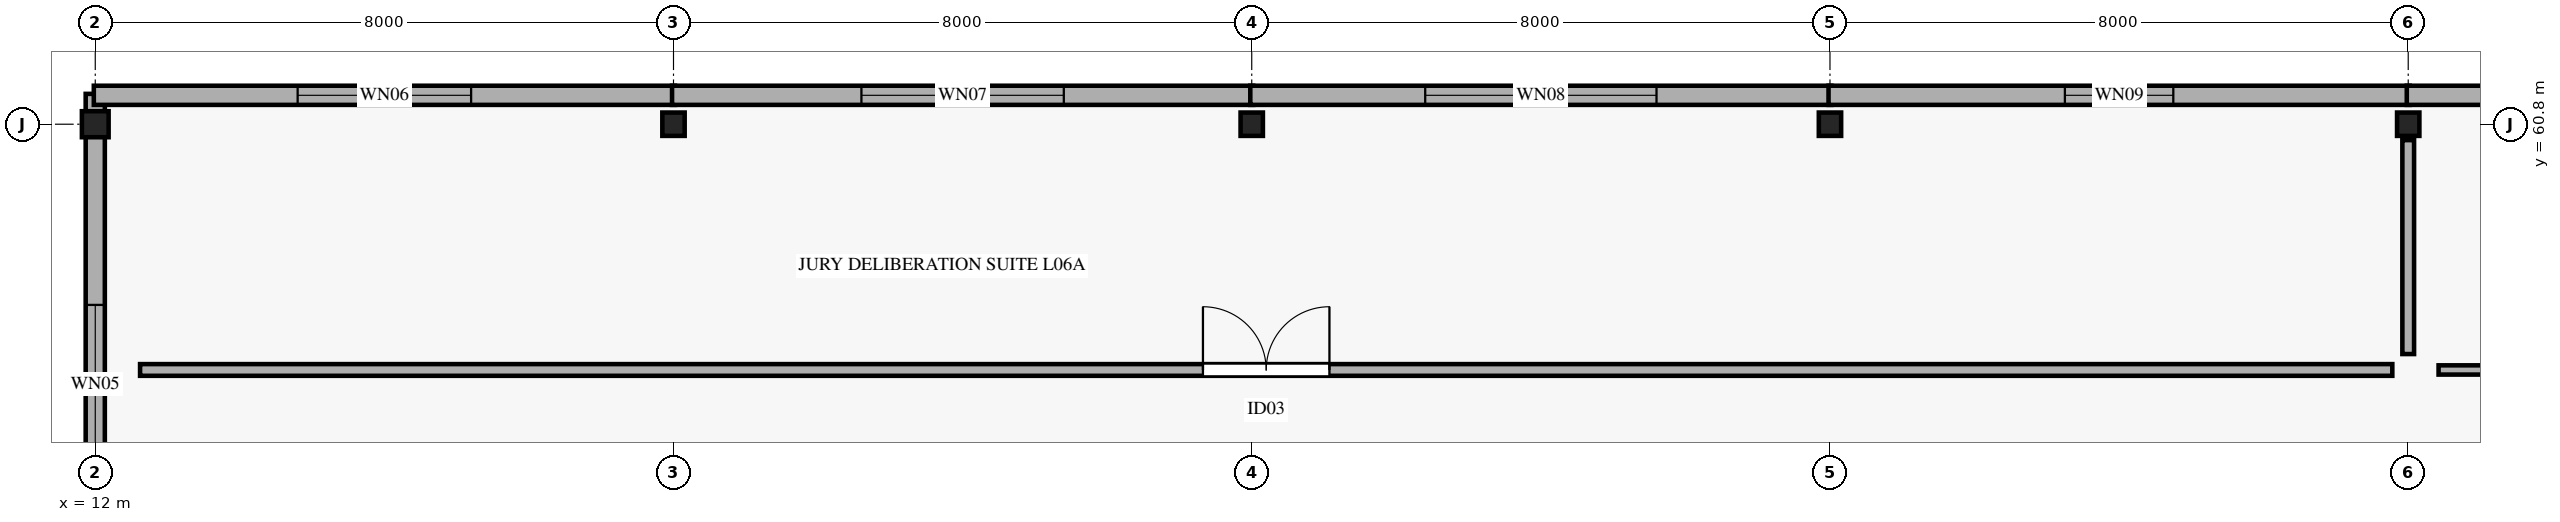
"""IFC4 building model, lengths in metres.
Left out: names, types, materials, properties, quantities, classifications, styles, units other than length and angle.
Written with IfcOpenShell. Run it as: python <this file> out.ifc"""

import sys

from ifc_helpers import new_model, si_unit, direction, frame, frame_2d, origin, origin_2d, place, context, subcontext, project, spatial, rectangle, i_section, extrude, element, fill, save


model = new_model("IFC4")
c1 = context("Model", 3, precision=1e-05, world=origin(), true_north=direction((0.0, 1.0)))
c2 = subcontext(c1, "Body", "Model", "MODEL_VIEW")
j1 = project(units=[si_unit("LENGTHUNIT", "METRE"), si_unit("PLANEANGLEUNIT", "RADIAN")], contexts=[c1])
p1 = place(None, origin())
s1 = spatial("IfcSite", under=j1, at=p1, CompositionType="ELEMENT")
p2 = place(p1, origin())
s2 = spatial("IfcBuilding", under=s1, at=p2, CompositionType="ELEMENT")
p3 = place(p2, frame((0.0, 0.0, 29.4)))
s3 = spatial("IfcBuildingStorey", under=s2, at=p3, CompositionType="ELEMENT", Elevation=29.4)
p4 = place(p3, frame((12.0, 60.8, 0.0), z_axis=(0.0, 0.0, 1.0), x_axis=(1.0, 0.0, 0.0)))
e1 = element("IfcColumn", 1, at=p4, inside=s3, PredefinedType="COLUMN", context=c2, shape_type="SweptSolid", body=[
    extrude(i_section(OverallWidth=0.37, OverallDepth=0.36, WebThickness=0.012, FlangeThickness=0.02, FilletRadius=0.015, at=origin_2d()), origin(), (0.0, 0.0, 1.0), 4.0),
])
for number, where, z_axis, x_axis in (
    (2, (20.0, 60.8, 0.0), (0.0, 0.0, 1.0), (1.0, 0.0, 0.0)),
    (3, (28.0, 60.8, 0.0), (0.0, 0.0, 1.0), (1.0, 0.0, 0.0)),
    (4, (36.0, 60.8, 0.0), (0.0, 0.0, 1.0), (1.0, 0.0, 0.0)),
    (5, (44.0, 60.8, 0.0), (0.0, 0.0, 1.0), (1.0, 0.0, 0.0)),
):
    element("IfcColumn", number, at=place(p3, frame(where, z_axis=z_axis, x_axis=x_axis)), inside=s3, PredefinedType="COLUMN", context=c2, shape_type="SweptSolid", body=[
        extrude(i_section(OverallWidth=0.309, OverallDepth=0.323, WebThickness=0.014, FlangeThickness=0.023, FilletRadius=0.015, at=origin_2d()), origin(), (0.0, 0.0, 1.0), 4.0),
    ])
p5 = place(p3, frame((12.0, 53.18, 0.0), z_axis=(0.0, 0.0, 1.0), x_axis=(0.0, 1.0, 0.0)))
e6 = element("IfcWall", 6, at=p5, inside=s3, PredefinedType="STANDARD", context=c2, shape_type="SweptSolid", body=[
    extrude(rectangle(XDim=8.04, YDim=0.265, at=frame_2d((4.02, 0.0))), origin(), (0.0, 0.0, 1.0), 3.06),
])
p6 = place(p5, frame((2.92, 0.0, 0.75)))
e7 = element("IfcOpeningElement", 7, at=p6, cuts=e6, PredefinedType="OPENING", context=c2, shape_type="SweptSolid", body=[
    extrude(rectangle(XDim=2.2, YDim=2.0, at=frame_2d((1.1, 1.0))), frame((0.0, 0.142, 0.0), z_axis=(0.0, -1.0, 0.0), x_axis=(1.0, 0.0, 0.0)), (0.0, 0.0, 1.0), 0.285),
])
p7 = place(p3, frame((11.98, 61.2, 0.0), z_axis=(0.0, 0.0, 1.0), x_axis=(1.0, 0.0, 0.0)))
e8 = element("IfcWall", 8, at=p7, inside=s3, PredefinedType="STANDARD", context=c2, shape_type="SweptSolid", body=[
    extrude(rectangle(XDim=8.04, YDim=0.265, at=frame_2d((4.02, 0.0))), origin(), (0.0, 0.0, 1.0), 3.06),
])
p8 = place(p7, frame((2.82, 0.0, 0.75)))
e9 = element("IfcOpeningElement", 9, at=p8, cuts=e8, PredefinedType="OPENING", context=c2, shape_type="SweptSolid", body=[
    extrude(rectangle(XDim=2.4, YDim=2.0, at=frame_2d((1.2, 1.0))), frame((0.0, 0.142, 0.0), z_axis=(0.0, -1.0, 0.0), x_axis=(1.0, 0.0, 0.0)), (0.0, 0.0, 1.0), 0.285),
])
p9 = place(p3, frame((19.98, 61.2, 0.0), z_axis=(0.0, 0.0, 1.0), x_axis=(1.0, 0.0, 0.0)))
e10 = element("IfcWall", 10, at=p9, inside=s3, PredefinedType="STANDARD", context=c2, shape_type="SweptSolid", body=[
    extrude(rectangle(XDim=8.04, YDim=0.265, at=frame_2d((4.02, 0.0))), origin(), (0.0, 0.0, 1.0), 3.06),
])
p10 = place(p9, frame((2.62, 0.0, 0.75)))
e11 = element("IfcOpeningElement", 11, at=p10, cuts=e10, PredefinedType="OPENING", context=c2, shape_type="SweptSolid", body=[
    extrude(rectangle(XDim=2.8, YDim=2.0, at=frame_2d((1.4, 1.0))), frame((0.0, 0.142, 0.0), z_axis=(0.0, -1.0, 0.0), x_axis=(1.0, 0.0, 0.0)), (0.0, 0.0, 1.0), 0.285),
])
p11 = place(p3, frame((27.98, 61.2, 0.0), z_axis=(0.0, 0.0, 1.0), x_axis=(1.0, 0.0, 0.0)))
e12 = element("IfcWall", 12, at=p11, inside=s3, PredefinedType="STANDARD", context=c2, shape_type="SweptSolid", body=[
    extrude(rectangle(XDim=8.04, YDim=0.265, at=frame_2d((4.02, 0.0))), origin(), (0.0, 0.0, 1.0), 3.06),
])
p12 = place(p11, frame((2.42, 0.0, 0.75)))
e13 = element("IfcOpeningElement", 13, at=p12, cuts=e12, PredefinedType="OPENING", context=c2, shape_type="SweptSolid", body=[
    extrude(rectangle(XDim=3.2, YDim=2.0, at=frame_2d((1.6, 1.0))), frame((0.0, 0.142, 0.0), z_axis=(0.0, -1.0, 0.0), x_axis=(1.0, 0.0, 0.0)), (0.0, 0.0, 1.0), 0.285),
])
p13 = place(p3, frame((35.98, 61.2, 0.0), z_axis=(0.0, 0.0, 1.0), x_axis=(1.0, 0.0, 0.0)))
e14 = element("IfcWall", 14, at=p13, inside=s3, PredefinedType="STANDARD", context=c2, shape_type="SweptSolid", body=[
    extrude(rectangle(XDim=8.04, YDim=0.265, at=frame_2d((4.02, 0.0))), origin(), (0.0, 0.0, 1.0), 3.06),
])
p14 = place(p13, frame((3.27, 0.0, 0.75)))
e15 = element("IfcOpeningElement", 15, at=p14, cuts=e14, PredefinedType="OPENING", context=c2, shape_type="SweptSolid", body=[
    extrude(rectangle(XDim=1.5, YDim=2.15, at=frame_2d((0.75, 1.075))), frame((0.0, 0.142, 0.0), z_axis=(0.0, -1.0, 0.0), x_axis=(1.0, 0.0, 0.0)), (0.0, 0.0, 1.0), 0.285),
])
p15 = place(p3, frame((43.98, 61.2, 0.0), z_axis=(0.0, 0.0, 1.0), x_axis=(1.0, 0.0, 0.0)))
e16 = element("IfcWall", 16, at=p15, inside=s3, PredefinedType="STANDARD", context=c2, shape_type="SweptSolid", body=[
    extrude(rectangle(XDim=8.04, YDim=0.265, at=frame_2d((4.02, 0.0))), origin(), (0.0, 0.0, 1.0), 3.06),
])
p16 = place(p15, frame((3.145, 0.0, 0.75)))
e17 = element("IfcOpeningElement", 17, at=p16, cuts=e16, PredefinedType="OPENING", context=c2, shape_type="SweptSolid", body=[
    extrude(rectangle(XDim=1.75, YDim=2.15, at=frame_2d((0.875, 1.075))), frame((0.0, 0.142, 0.0), z_axis=(0.0, -1.0, 0.0), x_axis=(1.0, 0.0, 0.0)), (0.0, 0.0, 1.0), 0.285),
])
p17 = place(p3, frame((12.62, 57.4, 0.0), z_axis=(0.0, 0.0, 1.0), x_axis=(1.0, 0.0, 0.0)))
e18 = element("IfcWall", 18, at=p17, inside=s3, PredefinedType="PARTITIONING", context=c2, shape_type="SweptSolid", body=[
    extrude(rectangle(XDim=31.16, YDim=0.162, at=frame_2d((15.58, 0.0))), origin(), (0.0, 0.0, 1.0), 2.85),
])
p18 = place(p17, frame((14.705, 0.0, 0.0)))
e19 = element("IfcOpeningElement", 19, at=p18, cuts=e18, PredefinedType="OPENING", context=c2, shape_type="SweptSolid", body=[
    extrude(rectangle(XDim=1.75, YDim=2.35, at=frame_2d((0.875, 1.175))), frame((0.0, 0.091, 0.0), z_axis=(0.0, -1.0, 0.0), x_axis=(1.0, 0.0, 0.0)), (0.0, 0.0, 1.0), 0.182),
])
p19 = place(p3, frame((44.0, 57.62, 0.0), z_axis=(0.0, 0.0, 1.0), x_axis=(0.0, 1.0, 0.0)))
e20 = element("IfcWall", 20, at=p19, inside=s3, PredefinedType="PARTITIONING", context=c2, shape_type="SweptSolid", body=[
    extrude(rectangle(XDim=2.96, YDim=0.162, at=frame_2d((1.48, 0.0))), origin(), (0.0, 0.0, 1.0), 2.85),
])
p20 = place(p3, frame((44.42, 57.4, 0.0), z_axis=(0.0, 0.0, 1.0), x_axis=(1.0, 0.0, 0.0)))
e21 = element("IfcWall", 21, at=p20, inside=s3, PredefinedType="PARTITIONING", context=c2, shape_type="SweptSolid", body=[
    extrude(rectangle(XDim=22.96, YDim=0.128, at=frame_2d((11.48, 0.0))), origin(), (0.0, 0.0, 1.0), 2.85),
])
p21 = place(p20, frame((10.68, 0.0, 0.0)))
e22 = element("IfcOpeningElement", 22, at=p21, cuts=e21, PredefinedType="OPENING", context=c2, shape_type="SweptSolid", body=[
    extrude(rectangle(XDim=1.6, YDim=2.35, at=frame_2d((0.8, 1.175))), frame((0.0, 0.074, 0.0), z_axis=(0.0, -1.0, 0.0), x_axis=(1.0, 0.0, 0.0)), (0.0, 0.0, 1.0), 0.148),
])
p22 = place(p6, origin())
e23 = element("IfcWindow", 23, at=p22, inside=s3, PartitioningType="SINGLE_PANEL", PredefinedType="WINDOW", context=c2, shape_type="SweptSolid", body=[
    extrude(rectangle(XDim=2.2, YDim=2.0, at=frame_2d((1.1, 1.0))), frame((0.0, 0.03, 0.0), z_axis=(0.0, -1.0, 0.0), x_axis=(1.0, 0.0, 0.0)), (0.0, 0.0, 1.0), 0.06),
])
fill(e7, e23)
p23 = place(p8, origin())
e24 = element("IfcWindow", 24, at=p23, inside=s3, PartitioningType="SINGLE_PANEL", PredefinedType="WINDOW", context=c2, shape_type="SweptSolid", body=[
    extrude(rectangle(XDim=2.4, YDim=2.0, at=frame_2d((1.2, 1.0))), frame((0.0, 0.03, 0.0), z_axis=(0.0, -1.0, 0.0), x_axis=(1.0, 0.0, 0.0)), (0.0, 0.0, 1.0), 0.06),
])
fill(e9, e24)
p24 = place(p10, origin())
e25 = element("IfcWindow", 25, at=p24, inside=s3, PartitioningType="SINGLE_PANEL", PredefinedType="WINDOW", context=c2, shape_type="SweptSolid", body=[
    extrude(rectangle(XDim=2.8, YDim=2.0, at=frame_2d((1.4, 1.0))), frame((0.0, 0.03, 0.0), z_axis=(0.0, -1.0, 0.0), x_axis=(1.0, 0.0, 0.0)), (0.0, 0.0, 1.0), 0.06),
])
fill(e11, e25)
p25 = place(p12, origin())
e26 = element("IfcWindow", 26, at=p25, inside=s3, PartitioningType="SINGLE_PANEL", PredefinedType="WINDOW", context=c2, shape_type="SweptSolid", body=[
    extrude(rectangle(XDim=3.2, YDim=2.0, at=frame_2d((1.6, 1.0))), frame((0.0, 0.03, 0.0), z_axis=(0.0, -1.0, 0.0), x_axis=(1.0, 0.0, 0.0)), (0.0, 0.0, 1.0), 0.06),
])
fill(e13, e26)
p26 = place(p14, origin())
e27 = element("IfcWindow", 27, at=p26, inside=s3, PartitioningType="SINGLE_PANEL", PredefinedType="WINDOW", context=c2, shape_type="SweptSolid", body=[
    extrude(rectangle(XDim=1.5, YDim=2.15, at=frame_2d((0.75, 1.075))), frame((0.0, 0.03, 0.0), z_axis=(0.0, -1.0, 0.0), x_axis=(1.0, 0.0, 0.0)), (0.0, 0.0, 1.0), 0.06),
])
fill(e15, e27)
p27 = place(p18, origin())
e28 = element("IfcDoor", 28, at=p27, inside=s3, OperationType="DOUBLE_DOOR_SINGLE_SWING", PredefinedType="DOOR", context=c2, shape_type="SweptSolid", body=[
    extrude(rectangle(XDim=1.75, YDim=2.35, at=frame_2d((0.875, 1.175))), frame((0.0, 0.025, 0.0), z_axis=(0.0, -1.0, 0.0), x_axis=(1.0, 0.0, 0.0)), (0.0, 0.0, 1.0), 0.05),
])
fill(e19, e28)
save(model, sys.argv[1])
